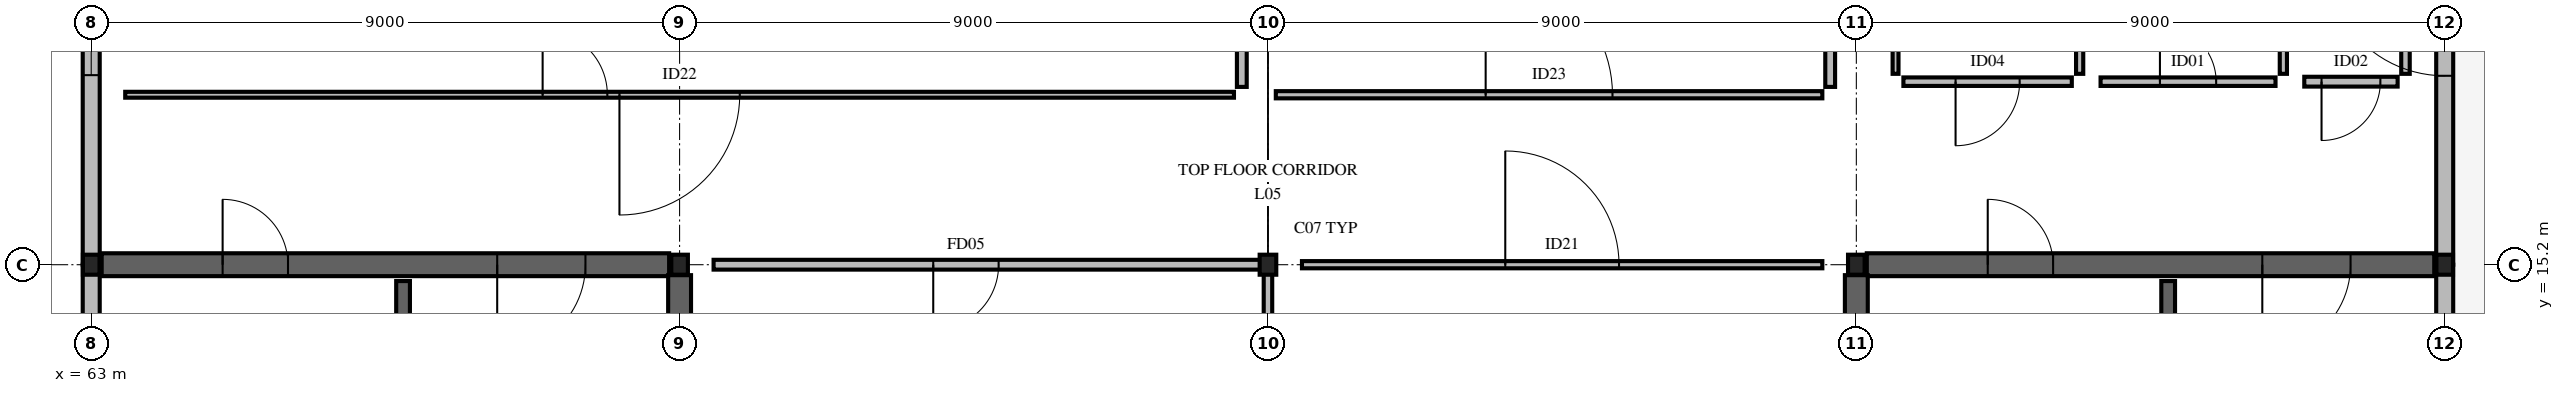
"""IFC4 building model, lengths in metres.
Left out: names, types, materials, properties, quantities, classifications, styles, units other than length and angle.
Written with IfcOpenShell. Run it as: python <this file> out.ifc"""

import sys

from ifc_helpers import new_model, si_unit, direction, frame, frame_2d, origin, origin_2d, place, context, subcontext, project, spatial, rectangle, i_section, extrude, element, fill, save


model = new_model("IFC4")
c1 = context("Model", 3, precision=1e-05, world=origin(), true_north=direction((0.0, 1.0)))
c2 = subcontext(c1, "Body", "Model", "MODEL_VIEW")
j1 = project(units=[si_unit("LENGTHUNIT", "METRE"), si_unit("PLANEANGLEUNIT", "RADIAN")], contexts=[c1])
p1 = place(None, origin())
s1 = spatial("IfcSite", under=j1, at=p1, CompositionType="ELEMENT")
p2 = place(p1, origin())
s2 = spatial("IfcBuilding", under=s1, at=p2, CompositionType="ELEMENT")
p3 = place(p2, frame((0.0, 0.0, 22.32)))
s3 = spatial("IfcBuildingStorey", under=s2, at=p3, CompositionType="ELEMENT", Elevation=22.32)
for number, where, z_axis, x_axis in (
    (1, (63.0, 15.2, 0.0), (0.0, 0.0, 1.0), (1.0, 0.0, 0.0)),
    (2, (72.0, 15.2, 0.0), (0.0, 0.0, 1.0), (1.0, 0.0, 0.0)),
    (3, (81.0, 15.2, 0.0), (0.0, 0.0, 1.0), (1.0, 0.0, 0.0)),
    (4, (90.0, 15.2, 0.0), (0.0, 0.0, 1.0), (1.0, 0.0, 0.0)),
    (5, (99.0, 15.2, 0.0), (0.0, 0.0, 1.0), (1.0, 0.0, 0.0)),
):
    element("IfcColumn", number, at=place(p3, frame(where, z_axis=z_axis, x_axis=x_axis)), inside=s3, PredefinedType="COLUMN", context=c2, shape_type="SweptSolid", body=[
        extrude(i_section(OverallWidth=0.254, OverallDepth=0.306, WebThickness=0.009, FlangeThickness=0.015, FilletRadius=0.015, at=origin_2d()), origin(), (0.0, 0.0, 1.0), 4.32),
    ])
p4 = place(p3, frame((99.0, 7.6, 0.0), z_axis=(0.0, 0.0, 1.0), x_axis=(0.0, 1.0, 0.0)))
e6 = element("IfcWall", 6, at=p4, inside=s3, PredefinedType="STANDARD", context=c2, shape_type="SweptSolid", body=[
    extrude(rectangle(XDim=7.6, YDim=0.26, at=frame_2d((3.8, 0.0))), origin(), (0.0, 0.0, 1.0), 3.559),
])
p5 = place(p4, frame((3.125, 0.0, 0.85)))
e7 = element("IfcOpeningElement", 7, at=p5, cuts=e6, PredefinedType="OPENING", context=c2, shape_type="SweptSolid", body=[
    extrude(rectangle(XDim=1.35, YDim=1.2, at=frame_2d((0.675, 0.6))), frame((0.0, 0.14, 0.0), z_axis=(0.0, -1.0, 0.0), x_axis=(1.0, 0.0, 0.0)), (0.0, 0.0, 1.0), 0.28),
])
p6 = place(p3, frame((63.0, 7.6, 0.0), z_axis=(0.0, 0.0, 1.0), x_axis=(0.0, 1.0, 0.0)))
e8 = element("IfcWall", 8, at=p6, inside=s3, PredefinedType="STANDARD", context=c2, shape_type="SweptSolid", body=[
    extrude(rectangle(XDim=7.6, YDim=0.26, at=frame_2d((3.8, 0.0))), origin(), (0.0, 0.0, 1.0), 3.559),
])
p7 = place(p6, frame((3.05, 0.0, 0.85)))
e9 = element("IfcOpeningElement", 9, at=p7, cuts=e8, PredefinedType="OPENING", context=c2, shape_type="SweptSolid", body=[
    extrude(rectangle(XDim=1.5, YDim=1.2, at=frame_2d((0.75, 0.6))), frame((0.0, 0.14, 0.0), z_axis=(0.0, -1.0, 0.0), x_axis=(1.0, 0.0, 0.0)), (0.0, 0.0, 1.0), 0.28),
])
p8 = place(p3, frame((99.0, 15.2, 0.0), z_axis=(0.0, 0.0, 1.0), x_axis=(0.0, 1.0, 0.0)))
e10 = element("IfcWall", 10, at=p8, inside=s3, PredefinedType="STANDARD", context=c2, shape_type="SweptSolid", body=[
    extrude(rectangle(XDim=7.81, YDim=0.26, at=frame_2d((3.905, 0.0))), origin(), (0.0, 0.0, 1.0), 3.559),
])
p9 = place(p8, frame((2.89, 0.0, 0.0)))
e11 = element("IfcOpeningElement", 11, at=p9, cuts=e10, PredefinedType="OPENING", context=c2, shape_type="SweptSolid", body=[
    extrude(rectangle(XDim=1.82, YDim=2.2, at=frame_2d((0.91, 1.1))), frame((0.0, 0.14, 0.0), z_axis=(0.0, -1.0, 0.0), x_axis=(1.0, 0.0, 0.0)), (0.0, 0.0, 1.0), 0.28),
])
p10 = place(p3, frame((63.0, 15.2, 0.0), z_axis=(0.0, 0.0, 1.0), x_axis=(0.0, 1.0, 0.0)))
e12 = element("IfcWall", 12, at=p10, inside=s3, PredefinedType="STANDARD", context=c2, shape_type="SweptSolid", body=[
    extrude(rectangle(XDim=7.81, YDim=0.26, at=frame_2d((3.905, 0.0))), origin(), (0.0, 0.0, 1.0), 3.559),
])
p11 = place(p10, frame((2.9, 0.0, 0.85)))
e13 = element("IfcOpeningElement", 13, at=p11, cuts=e12, PredefinedType="OPENING", context=c2, shape_type="SweptSolid", body=[
    extrude(rectangle(XDim=1.8, YDim=1.2, at=frame_2d((0.9, 0.6))), frame((0.0, 0.14, 0.0), z_axis=(0.0, -1.0, 0.0), x_axis=(1.0, 0.0, 0.0)), (0.0, 0.0, 1.0), 0.28),
])
p12 = place(p3, frame((63.16, 15.2, 0.0), z_axis=(0.0, 0.0, 1.0), x_axis=(1.0, 0.0, 0.0)))
e14 = element("IfcWall", 14, at=p12, inside=s3, PredefinedType="SHEAR", context=c2, shape_type="SweptSolid", body=[
    extrude(rectangle(XDim=8.68, YDim=0.35, at=frame_2d((4.34, 0.0))), origin(), (0.0, 0.0, 1.0), 4.04),
])
p13 = place(p12, frame((1.85, 0.0, 0.0)))
e15 = element("IfcOpeningElement", 15, at=p13, cuts=e14, PredefinedType="OPENING", context=c2, shape_type="SweptSolid", body=[
    extrude(rectangle(XDim=1.0, YDim=2.15, at=frame_2d((0.5, 1.075))), frame((0.0, 0.185, 0.0), z_axis=(0.0, -1.0, 0.0), x_axis=(1.0, 0.0, 0.0)), (0.0, 0.0, 1.0), 0.37),
])
p14 = place(p12, frame((6.05, 0.0, 0.0)))
e16 = element("IfcOpeningElement", 16, at=p14, cuts=e14, PredefinedType="OPENING", context=c2, shape_type="SweptSolid", body=[
    extrude(rectangle(XDim=1.35, YDim=2.18, at=frame_2d((0.675, 1.09))), frame((0.0, 0.185, 0.0), z_axis=(0.0, -1.0, 0.0), x_axis=(1.0, 0.0, 0.0)), (0.0, 0.0, 1.0), 0.37),
])
p15 = place(p3, frame((72.0, 0.16, 0.0), z_axis=(0.0, 0.0, 1.0), x_axis=(0.0, 1.0, 0.0)))
e17 = element("IfcWall", 17, at=p15, inside=s3, PredefinedType="SHEAR", context=c2, shape_type="SweptSolid", body=[
    extrude(rectangle(XDim=14.88, YDim=0.35, at=frame_2d((7.44, 0.0))), origin(), (0.0, 0.0, 1.0), 4.04),
])
p16 = place(p3, frame((67.77, 4.35, 0.0), z_axis=(0.0, 0.0, 1.0), x_axis=(0.0, 1.0, 0.0)))
e18 = element("IfcWall", 18, at=p16, inside=s3, PredefinedType="SOLIDWALL", context=c2, shape_type="SweptSolid", body=[
    extrude(rectangle(XDim=10.6, YDim=0.21, at=frame_2d((5.3, 0.0))), origin(), (0.0, 0.0, 1.0), 4.04),
])
p17 = place(p3, frame((90.16, 15.2, 0.0), z_axis=(0.0, 0.0, 1.0), x_axis=(1.0, 0.0, 0.0)))
e19 = element("IfcWall", 19, at=p17, inside=s3, PredefinedType="SHEAR", context=c2, shape_type="SweptSolid", body=[
    extrude(rectangle(XDim=8.68, YDim=0.35, at=frame_2d((4.34, 0.0))), origin(), (0.0, 0.0, 1.0), 4.04),
])
p18 = place(p17, frame((1.85, 0.0, 0.0)))
e20 = element("IfcOpeningElement", 20, at=p18, cuts=e19, PredefinedType="OPENING", context=c2, shape_type="SweptSolid", body=[
    extrude(rectangle(XDim=1.0, YDim=2.15, at=frame_2d((0.5, 1.075))), frame((0.0, 0.185, 0.0), z_axis=(0.0, -1.0, 0.0), x_axis=(1.0, 0.0, 0.0)), (0.0, 0.0, 1.0), 0.37),
])
p19 = place(p17, frame((6.05, 0.0, 0.0)))
e21 = element("IfcOpeningElement", 21, at=p19, cuts=e19, PredefinedType="OPENING", context=c2, shape_type="SweptSolid", body=[
    extrude(rectangle(XDim=1.35, YDim=2.18, at=frame_2d((0.675, 1.09))), frame((0.0, 0.185, 0.0), z_axis=(0.0, -1.0, 0.0), x_axis=(1.0, 0.0, 0.0)), (0.0, 0.0, 1.0), 0.37),
])
p20 = place(p3, frame((90.0, 0.16, 0.0), z_axis=(0.0, 0.0, 1.0), x_axis=(0.0, 1.0, 0.0)))
e22 = element("IfcWall", 22, at=p20, inside=s3, PredefinedType="SHEAR", context=c2, shape_type="SweptSolid", body=[
    extrude(rectangle(XDim=14.88, YDim=0.35, at=frame_2d((7.44, 0.0))), origin(), (0.0, 0.0, 1.0), 4.04),
])
p21 = place(p3, frame((94.77, 4.35, 0.0), z_axis=(0.0, 0.0, 1.0), x_axis=(0.0, 1.0, 0.0)))
e23 = element("IfcWall", 23, at=p21, inside=s3, PredefinedType="SOLIDWALL", context=c2, shape_type="SweptSolid", body=[
    extrude(rectangle(XDim=10.6, YDim=0.21, at=frame_2d((5.3, 0.0))), origin(), (0.0, 0.0, 1.0), 4.04),
])
p22 = place(p3, frame((72.52, 15.2, 0.0), z_axis=(0.0, 0.0, 1.0), x_axis=(1.0, 0.0, 0.0)))
e24 = element("IfcWall", 24, at=p22, inside=s3, PredefinedType="PARTITIONING", context=c2, shape_type="SweptSolid", body=[
    extrude(rectangle(XDim=8.36, YDim=0.15, at=frame_2d((4.18, 0.0))), origin(), (0.0, 0.0, 1.0), 3.484),
])
p23 = place(p22, frame((3.36, 0.0, 0.0)))
e25 = element("IfcOpeningElement", 25, at=p23, cuts=e24, PredefinedType="OPENING", context=c2, shape_type="SweptSolid", body=[
    extrude(rectangle(XDim=1.0, YDim=2.15, at=frame_2d((0.5, 1.075))), frame((0.0, 0.085, 0.0), z_axis=(0.0, -1.0, 0.0), x_axis=(1.0, 0.0, 0.0)), (0.0, 0.0, 1.0), 0.17),
])
p24 = place(p3, frame((81.0, 0.52, 0.0), z_axis=(0.0, 0.0, 1.0), x_axis=(0.0, 1.0, 0.0)))
e26 = element("IfcWall", 26, at=p24, inside=s3, PredefinedType="PARTITIONING", context=c2, shape_type="SweptSolid", body=[
    extrude(rectangle(XDim=14.56, YDim=0.13, at=frame_2d((7.28, 0.0))), origin(), (0.0, 0.0, 1.0), 3.559),
])
p25 = place(p3, frame((81.52, 15.2, 0.0), z_axis=(0.0, 0.0, 1.0), x_axis=(1.0, 0.0, 0.0)))
e27 = element("IfcWall", 27, at=p25, inside=s3, PredefinedType="PARTITIONING", context=c2, shape_type="SweptSolid", body=[
    extrude(rectangle(XDim=7.96, YDim=0.11, at=frame_2d((3.98, 0.0))), origin(), (0.0, 0.0, 1.0), 3.484),
])
p26 = place(p25, frame((3.11, 0.0, 0.0)))
e28 = element("IfcOpeningElement", 28, at=p26, cuts=e27, PredefinedType="OPENING", context=c2, shape_type="SweptSolid", body=[
    extrude(rectangle(XDim=1.74, YDim=2.1, at=frame_2d((0.87, 1.05))), frame((0.0, 0.065, 0.0), z_axis=(0.0, -1.0, 0.0), x_axis=(1.0, 0.0, 0.0)), (0.0, 0.0, 1.0), 0.13),
])
p27 = place(p3, frame((63.52, 17.8, 0.0), z_axis=(0.0, 0.0, 1.0), x_axis=(1.0, 0.0, 0.0)))
e29 = element("IfcWall", 29, at=p27, inside=s3, PredefinedType="PARTITIONING", context=c2, shape_type="SweptSolid", body=[
    extrude(rectangle(XDim=16.96, YDim=0.09, at=frame_2d((8.48, 0.0))), origin(), (0.0, 0.0, 1.0), 3.711),
])
p28 = place(p27, frame((7.56, 0.0, 0.0)))
e30 = element("IfcOpeningElement", 30, at=p28, cuts=e29, PredefinedType="OPENING", context=c2, shape_type="SweptSolid", body=[
    extrude(rectangle(XDim=1.84, YDim=2.1, at=frame_2d((0.92, 1.05))), frame((0.0, 0.055, 0.0), z_axis=(0.0, -1.0, 0.0), x_axis=(1.0, 0.0, 0.0)), (0.0, 0.0, 1.0), 0.11),
])
p29 = place(p27, frame((6.385, 0.0, 0.0)))
e31 = element("IfcOpeningElement", 31, at=p29, cuts=e29, PredefinedType="OPENING", context=c2, shape_type="SweptSolid", body=[
    extrude(rectangle(XDim=0.99, YDim=2.15, at=frame_2d((0.495, 1.075))), frame((0.0, 0.055, 0.0), z_axis=(0.0, -1.0, 0.0), x_axis=(1.0, 0.0, 0.0)), (0.0, 0.0, 1.0), 0.11),
])
p30 = place(p3, frame((80.6, 17.92, 0.0), z_axis=(0.0, 0.0, 1.0), x_axis=(0.0, 1.0, 0.0)))
e32 = element("IfcWall", 32, at=p30, inside=s3, PredefinedType="PARTITIONING", context=c2, shape_type="SweptSolid", body=[
    extrude(rectangle(XDim=4.36, YDim=0.15, at=frame_2d((2.18, 0.0))), origin(), (0.0, 0.0, 1.0), 4.04),
])
p31 = place(p3, frame((81.12, 17.8, 0.0), z_axis=(0.0, 0.0, 1.0), x_axis=(1.0, 0.0, 0.0)))
e33 = element("IfcWall", 33, at=p31, inside=s3, PredefinedType="PARTITIONING", context=c2, shape_type="SweptSolid", body=[
    extrude(rectangle(XDim=8.36, YDim=0.11, at=frame_2d((4.18, 0.0))), origin(), (0.0, 0.0, 1.0), 3.711),
])
p32 = place(p31, frame((3.21, 0.0, 0.0)))
e34 = element("IfcOpeningElement", 34, at=p32, cuts=e33, PredefinedType="OPENING", context=c2, shape_type="SweptSolid", body=[
    extrude(rectangle(XDim=1.94, YDim=2.1, at=frame_2d((0.97, 1.05))), frame((0.0, 0.065, 0.0), z_axis=(0.0, -1.0, 0.0), x_axis=(1.0, 0.0, 0.0)), (0.0, 0.0, 1.0), 0.13),
])
p33 = place(p3, frame((89.6, 17.92, 0.0), z_axis=(0.0, 0.0, 1.0), x_axis=(0.0, 1.0, 0.0)))
e35 = element("IfcWall", 35, at=p33, inside=s3, PredefinedType="PARTITIONING", context=c2, shape_type="SweptSolid", body=[
    extrude(rectangle(XDim=4.36, YDim=0.15, at=frame_2d((2.18, 0.0))), origin(), (0.0, 0.0, 1.0), 4.04),
])
p34 = place(p3, frame((90.72, 18.0, 0.0), z_axis=(0.0, 0.0, 1.0), x_axis=(1.0, 0.0, 0.0)))
e36 = element("IfcWall", 36, at=p34, inside=s3, PredefinedType="PARTITIONING", context=c2, shape_type="SweptSolid", body=[
    extrude(rectangle(XDim=2.576, YDim=0.13, at=frame_2d((1.288, 0.0))), origin(), (0.0, 0.0, 1.0), 4.04),
])
p35 = place(p34, frame((0.798, 0.0, 0.0)))
e37 = element("IfcOpeningElement", 37, at=p35, cuts=e36, PredefinedType="OPENING", context=c2, shape_type="SweptSolid", body=[
    extrude(rectangle(XDim=0.98, YDim=2.06, at=frame_2d((0.49, 1.03))), frame((0.0, 0.075, 0.0), z_axis=(0.0, -1.0, 0.0), x_axis=(1.0, 0.0, 0.0)), (0.0, 0.0, 1.0), 0.15),
])
p36 = place(p3, frame((93.416, 18.12, 0.0), z_axis=(0.0, 0.0, 1.0), x_axis=(0.0, 1.0, 0.0)))
e38 = element("IfcWall", 38, at=p36, inside=s3, PredefinedType="PARTITIONING", context=c2, shape_type="SweptSolid", body=[
    extrude(rectangle(XDim=3.96, YDim=0.11, at=frame_2d((1.98, 0.0))), origin(), (0.0, 0.0, 1.0), 4.04),
])
p37 = place(p3, frame((90.6, 18.12, 0.0), z_axis=(0.0, 0.0, 1.0), x_axis=(0.0, 1.0, 0.0)))
e39 = element("IfcWall", 39, at=p37, inside=s3, PredefinedType="PARTITIONING", context=c2, shape_type="SweptSolid", body=[
    extrude(rectangle(XDim=3.96, YDim=0.09, at=frame_2d((1.98, 0.0))), origin(), (0.0, 0.0, 1.0), 4.04),
])
p38 = place(p3, frame((93.736, 18.0, 0.0), z_axis=(0.0, 0.0, 1.0), x_axis=(1.0, 0.0, 0.0)))
e40 = element("IfcWall", 40, at=p38, inside=s3, PredefinedType="PARTITIONING", context=c2, shape_type="SweptSolid", body=[
    extrude(rectangle(XDim=2.676, YDim=0.13, at=frame_2d((1.338, 0.0))), origin(), (0.0, 0.0, 1.0), 4.04),
])
p39 = place(p38, frame((0.908, 0.0, 0.0)))
e41 = element("IfcOpeningElement", 41, at=p39, cuts=e40, PredefinedType="OPENING", context=c2, shape_type="SweptSolid", body=[
    extrude(rectangle(XDim=0.86, YDim=2.06, at=frame_2d((0.43, 1.03))), frame((0.0, 0.075, 0.0), z_axis=(0.0, -1.0, 0.0), x_axis=(1.0, 0.0, 0.0)), (0.0, 0.0, 1.0), 0.15),
])
p40 = place(p3, frame((96.532, 18.12, 0.0), z_axis=(0.0, 0.0, 1.0), x_axis=(0.0, 1.0, 0.0)))
e42 = element("IfcWall", 42, at=p40, inside=s3, PredefinedType="PARTITIONING", context=c2, shape_type="SweptSolid", body=[
    extrude(rectangle(XDim=3.96, YDim=0.11, at=frame_2d((1.98, 0.0))), origin(), (0.0, 0.0, 1.0), 4.04),
])
p41 = place(p3, frame((96.852, 18.0, 0.0), z_axis=(0.0, 0.0, 1.0), x_axis=(1.0, 0.0, 0.0)))
e43 = element("IfcWall", 43, at=p41, inside=s3, PredefinedType="PARTITIONING", context=c2, shape_type="SweptSolid", body=[
    extrude(rectangle(XDim=1.428, YDim=0.15, at=frame_2d((0.714, 0.0))), origin(), (0.0, 0.0, 1.0), 4.04),
])
p42 = place(p41, frame((0.264, 0.0, 0.0)))
e44 = element("IfcOpeningElement", 44, at=p42, cuts=e43, PredefinedType="OPENING", context=c2, shape_type="SweptSolid", body=[
    extrude(rectangle(XDim=0.9, YDim=2.06, at=frame_2d((0.45, 1.03))), frame((0.0, 0.085, 0.0), z_axis=(0.0, -1.0, 0.0), x_axis=(1.0, 0.0, 0.0)), (0.0, 0.0, 1.0), 0.17),
])
p43 = place(p3, frame((98.4, 18.12, 0.0), z_axis=(0.0, 0.0, 1.0), x_axis=(0.0, 1.0, 0.0)))
e45 = element("IfcWall", 45, at=p43, inside=s3, PredefinedType="PARTITIONING", context=c2, shape_type="SweptSolid", body=[
    extrude(rectangle(XDim=3.96, YDim=0.13, at=frame_2d((1.98, 0.0))), origin(), (0.0, 0.0, 1.0), 4.04),
])
p44 = place(p9, frame((1.82, 0.0, 0.0), z_axis=(0.0, 0.0, 1.0), x_axis=(-1.0, 0.0, 0.0)))
e46 = element("IfcDoor", 46, at=p44, inside=s3, OperationType="SINGLE_SWING_LEFT", PredefinedType="DOOR", context=c2, shape_type="SweptSolid", body=[
    extrude(rectangle(XDim=1.82, YDim=2.2, at=frame_2d((0.91, 1.1))), frame((0.0, 0.025, 0.0), z_axis=(0.0, -1.0, 0.0), x_axis=(1.0, 0.0, 0.0)), (0.0, 0.0, 1.0), 0.05),
])
fill(e11, e46)
p45 = place(p11, origin())
e47 = element("IfcWindow", 47, at=p45, inside=s3, PartitioningType="SINGLE_PANEL", PredefinedType="WINDOW", context=c2, shape_type="SweptSolid", body=[
    extrude(rectangle(XDim=1.8, YDim=1.2, at=frame_2d((0.9, 0.6))), frame((0.0, 0.03, 0.0), z_axis=(0.0, -1.0, 0.0), x_axis=(1.0, 0.0, 0.0)), (0.0, 0.0, 1.0), 0.06),
])
fill(e13, e47)
p46 = place(p13, origin())
e48 = element("IfcDoor", 48, at=p46, inside=s3, OperationType="SINGLE_SWING_LEFT", PredefinedType="DOOR", context=c2, shape_type="SweptSolid", body=[
    extrude(rectangle(XDim=1.0, YDim=2.15, at=frame_2d((0.5, 1.075))), frame((0.0, 0.025, 0.0), z_axis=(0.0, -1.0, 0.0), x_axis=(1.0, 0.0, 0.0)), (0.0, 0.0, 1.0), 0.05),
])
fill(e15, e48)
p47 = place(p14, origin())
e49 = element("IfcDoor", 49, at=p47, inside=s3, OperationType="SINGLE_SWING_RIGHT", PredefinedType="DOOR", context=c2, shape_type="SweptSolid", body=[
    extrude(rectangle(XDim=1.35, YDim=2.18, at=frame_2d((0.675, 1.09))), frame((0.0, 0.025, 0.0), z_axis=(0.0, -1.0, 0.0), x_axis=(1.0, 0.0, 0.0)), (0.0, 0.0, 1.0), 0.05),
])
fill(e16, e49)
p48 = place(p18, origin())
e50 = element("IfcDoor", 50, at=p48, inside=s3, OperationType="SINGLE_SWING_LEFT", PredefinedType="DOOR", context=c2, shape_type="SweptSolid", body=[
    extrude(rectangle(XDim=1.0, YDim=2.15, at=frame_2d((0.5, 1.075))), frame((0.0, 0.025, 0.0), z_axis=(0.0, -1.0, 0.0), x_axis=(1.0, 0.0, 0.0)), (0.0, 0.0, 1.0), 0.05),
])
fill(e20, e50)
p49 = place(p19, origin())
e51 = element("IfcDoor", 51, at=p49, inside=s3, OperationType="SINGLE_SWING_RIGHT", PredefinedType="DOOR", context=c2, shape_type="SweptSolid", body=[
    extrude(rectangle(XDim=1.35, YDim=2.18, at=frame_2d((0.675, 1.09))), frame((0.0, 0.025, 0.0), z_axis=(0.0, -1.0, 0.0), x_axis=(1.0, 0.0, 0.0)), (0.0, 0.0, 1.0), 0.05),
])
fill(e21, e51)
p50 = place(p23, origin())
e52 = element("IfcDoor", 52, at=p50, inside=s3, OperationType="SINGLE_SWING_RIGHT", PredefinedType="DOOR", context=c2, shape_type="SweptSolid", body=[
    extrude(rectangle(XDim=1.0, YDim=2.15, at=frame_2d((0.5, 1.075))), frame((0.0, 0.025, 0.0), z_axis=(0.0, -1.0, 0.0), x_axis=(1.0, 0.0, 0.0)), (0.0, 0.0, 1.0), 0.05),
])
fill(e25, e52)
p51 = place(p26, origin())
e53 = element("IfcDoor", 53, at=p51, inside=s3, OperationType="SINGLE_SWING_LEFT", PredefinedType="DOOR", context=c2, shape_type="SweptSolid", body=[
    extrude(rectangle(XDim=1.74, YDim=2.1, at=frame_2d((0.87, 1.05))), frame((0.0, 0.025, 0.0), z_axis=(0.0, -1.0, 0.0), x_axis=(1.0, 0.0, 0.0)), (0.0, 0.0, 1.0), 0.05),
])
fill(e28, e53)
p52 = place(p28, origin())
e54 = element("IfcDoor", 54, at=p52, inside=s3, OperationType="SINGLE_SWING_RIGHT", PredefinedType="DOOR", context=c2, shape_type="SweptSolid", body=[
    extrude(rectangle(XDim=1.84, YDim=2.1, at=frame_2d((0.92, 1.05))), frame((0.0, 0.025, 0.0), z_axis=(0.0, -1.0, 0.0), x_axis=(1.0, 0.0, 0.0)), (0.0, 0.0, 1.0), 0.05),
])
fill(e30, e54)
p53 = place(p32, origin())
e55 = element("IfcDoor", 55, at=p53, inside=s3, OperationType="SINGLE_SWING_LEFT", PredefinedType="DOOR", context=c2, shape_type="SweptSolid", body=[
    extrude(rectangle(XDim=1.94, YDim=2.1, at=frame_2d((0.97, 1.05))), frame((0.0, 0.025, 0.0), z_axis=(0.0, -1.0, 0.0), x_axis=(1.0, 0.0, 0.0)), (0.0, 0.0, 1.0), 0.05),
])
fill(e34, e55)
p54 = place(p35, origin())
e56 = element("IfcDoor", 56, at=p54, inside=s3, OperationType="SINGLE_SWING_RIGHT", PredefinedType="DOOR", context=c2, shape_type="SweptSolid", body=[
    extrude(rectangle(XDim=0.98, YDim=2.06, at=frame_2d((0.49, 1.03))), frame((0.0, 0.025, 0.0), z_axis=(0.0, -1.0, 0.0), x_axis=(1.0, 0.0, 0.0)), (0.0, 0.0, 1.0), 0.05),
])
fill(e37, e56)
p55 = place(p39, origin())
e57 = element("IfcDoor", 57, at=p55, inside=s3, OperationType="SINGLE_SWING_LEFT", PredefinedType="DOOR", context=c2, shape_type="SweptSolid", body=[
    extrude(rectangle(XDim=0.86, YDim=2.06, at=frame_2d((0.43, 1.03))), frame((0.0, 0.025, 0.0), z_axis=(0.0, -1.0, 0.0), x_axis=(1.0, 0.0, 0.0)), (0.0, 0.0, 1.0), 0.05),
])
fill(e41, e57)
p56 = place(p42, origin())
e58 = element("IfcDoor", 58, at=p56, inside=s3, OperationType="SINGLE_SWING_RIGHT", PredefinedType="DOOR", context=c2, shape_type="SweptSolid", body=[
    extrude(rectangle(XDim=0.9, YDim=2.06, at=frame_2d((0.45, 1.03))), frame((0.0, 0.025, 0.0), z_axis=(0.0, -1.0, 0.0), x_axis=(1.0, 0.0, 0.0)), (0.0, 0.0, 1.0), 0.05),
])
fill(e44, e58)
p57 = place(p29, origin())
e59 = element("IfcDoor", 59, at=p57, inside=s3, OperationType="SINGLE_SWING_LEFT", PredefinedType="DOOR", context=c2, shape_type="SweptSolid", body=[
    extrude(rectangle(XDim=0.99, YDim=2.15, at=frame_2d((0.495, 1.075))), frame((0.0, 0.025, 0.0), z_axis=(0.0, -1.0, 0.0), x_axis=(1.0, 0.0, 0.0)), (0.0, 0.0, 1.0), 0.05),
])
fill(e31, e59)
save(model, sys.argv[1])
